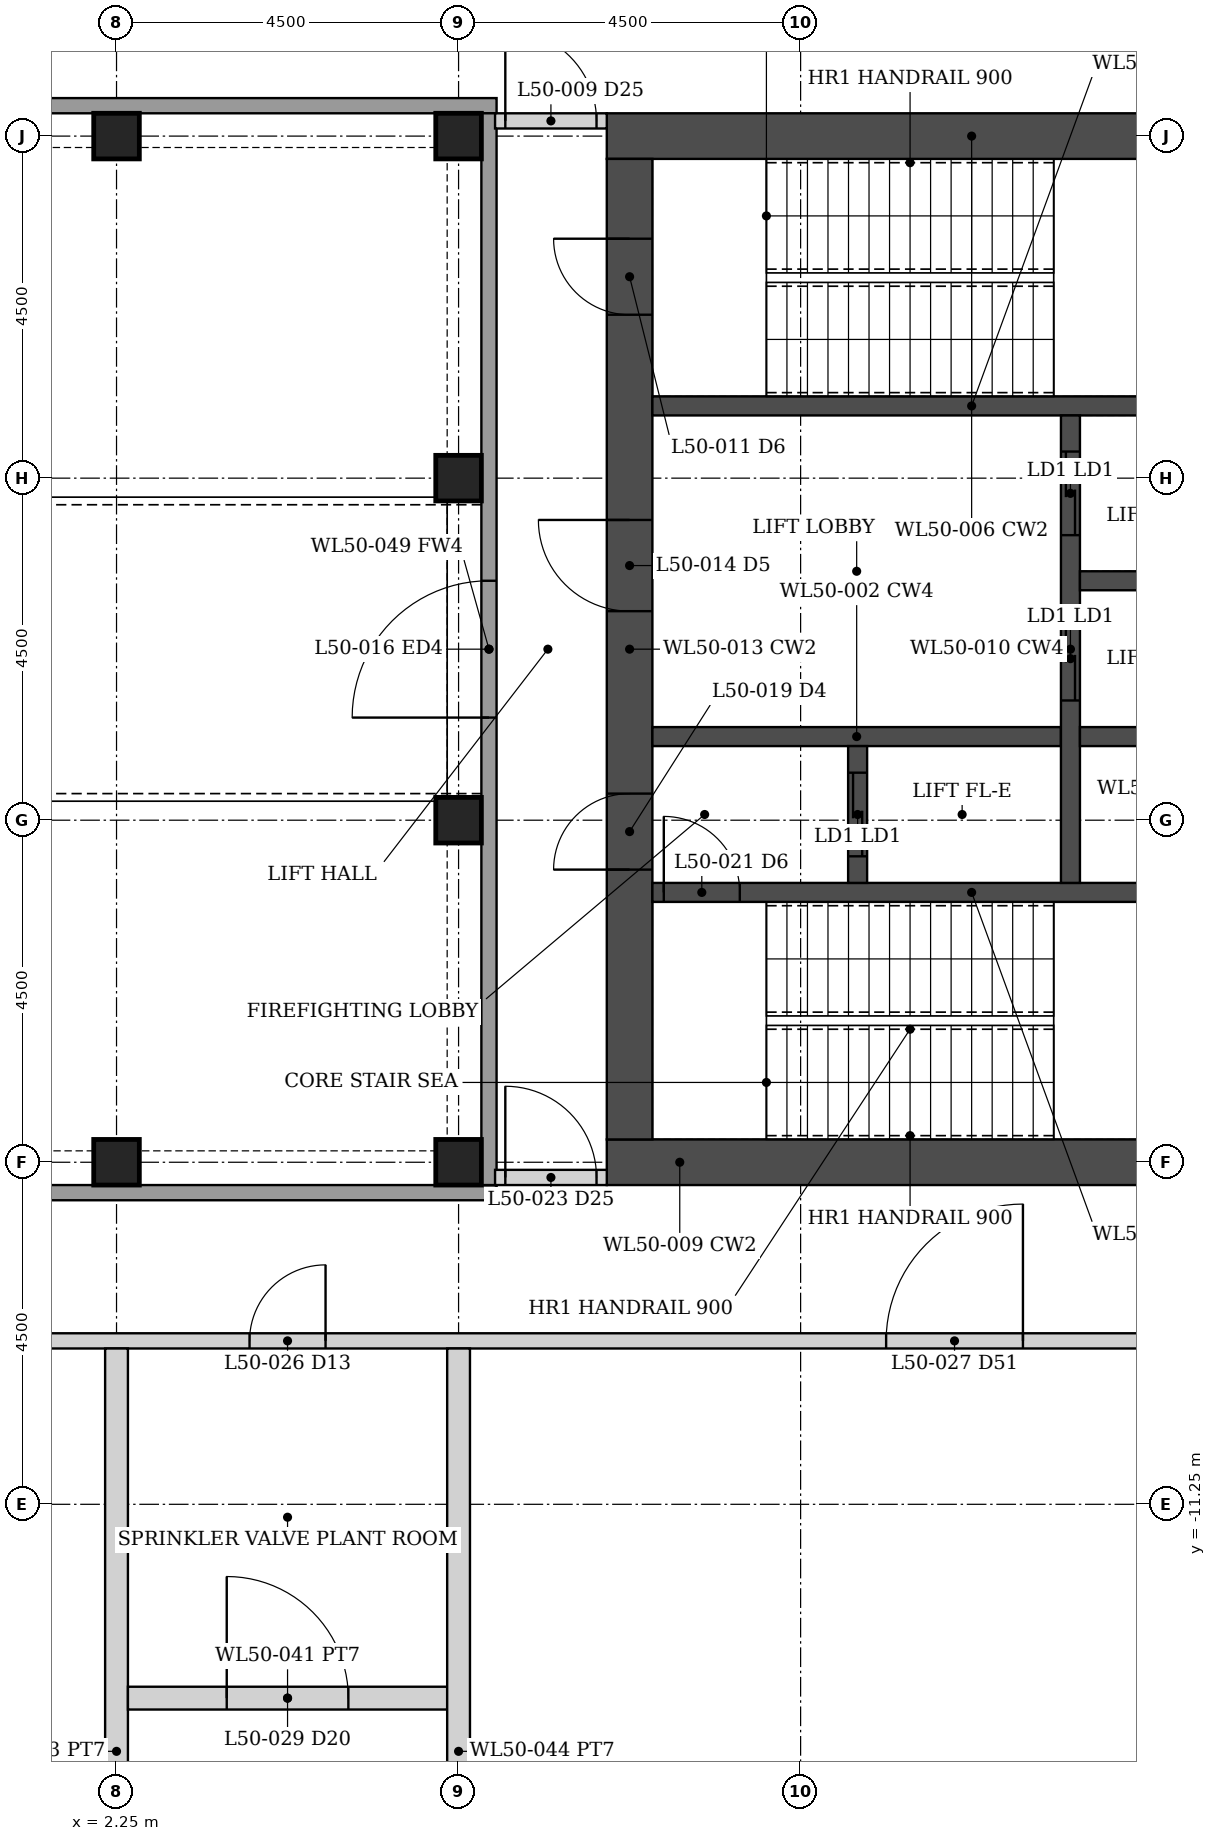
"""IFC4 building model, lengths in metres.
Left out: names, types, materials, properties, quantities, classifications, styles, units other than length and angle.
Written with IfcOpenShell. Run it as: python <this file> out.ifc"""

import sys

from ifc_helpers import new_model, si_unit, direction, frame, frame_2d, origin, origin_2d, place, context, subcontext, project, spatial, rectangle, hollow_rectangle, extrude, element, fill, save


model = new_model("IFC4")
c1 = context("Model", 3, precision=1e-05, world=origin(), true_north=direction((0.0, 1.0)))
c2 = subcontext(c1, "Body", "Model", "MODEL_VIEW")
j1 = project(units=[si_unit("LENGTHUNIT", "METRE"), si_unit("PLANEANGLEUNIT", "RADIAN")], contexts=[c1])
p1 = place(None, origin())
s1 = spatial("IfcSite", under=j1, at=p1, CompositionType="ELEMENT")
p2 = place(p1, origin())
s2 = spatial("IfcBuilding", under=s1, at=p2, CompositionType="ELEMENT")
p3 = place(p2, frame((0.0, 0.0, 190.4)))
s3 = spatial("IfcBuildingStorey", under=s2, at=p3, CompositionType="ELEMENT", Elevation=190.4)
for number, where, z_axis, x_axis in (
    (1, (2.25, -6.75, 0.0), (0.0, 0.0, 1.0), (1.0, 0.0, 0.0)),
    (2, (2.25, 6.75, 0.0), (0.0, 0.0, 1.0), (1.0, 0.0, 0.0)),
    (3, (6.75, -6.75, 0.0), (0.0, 0.0, 1.0), (1.0, 0.0, 0.0)),
    (4, (6.75, -2.25, 0.0), (0.0, 0.0, 1.0), (1.0, 0.0, 0.0)),
    (5, (6.75, 2.25, 0.0), (0.0, 0.0, 1.0), (1.0, 0.0, 0.0)),
    (6, (6.75, 6.75, 0.0), (0.0, 0.0, 1.0), (1.0, 0.0, 0.0)),
):
    element("IfcColumn", number, at=place(p3, frame(where, z_axis=z_axis, x_axis=x_axis)), inside=s3, PredefinedType="COLUMN", context=c2, shape_type="SweptSolid", body=[
        extrude(hollow_rectangle(XDim=0.6, YDim=0.6, WallThickness=0.03, at=origin_2d()), origin(), (0.0, 0.0, 1.0), 5.4),
    ])
for number, where, z_axis, x_axis in (
    (7, (8.7, -6.75, 0.0), (0.0, 0.0, 1.0), (1.0, 0.0, 0.0)),
    (8, (8.7, 6.75, 0.0), (0.0, 0.0, 1.0), (1.0, 0.0, 0.0)),
):
    element("IfcWall", number, at=place(p3, frame(where, z_axis=z_axis, x_axis=x_axis)), inside=s3, PredefinedType="SHEAR", context=c2, shape_type="SweptSolid", body=[
        extrude(rectangle(XDim=9.6, YDim=0.6, at=frame_2d((4.8, 0.0))), origin(), (0.0, 0.0, 1.0), 5.4),
    ])
p4 = place(p3, frame((9.0, -6.45, 0.0), z_axis=(0.0, 0.0, 1.0), x_axis=(0.0, 1.0, 0.0)))
e9 = element("IfcWall", 9, at=p4, inside=s3, PredefinedType="SHEAR", context=c2, shape_type="SweptSolid", body=[
    extrude(rectangle(XDim=12.9, YDim=0.6, at=frame_2d((6.45, 0.0))), origin(), (0.0, 0.0, 1.0), 5.4),
])
p5 = place(p4, frame((3.55, 0.0, 0.0)))
e10 = element("IfcOpeningElement", 10, at=p5, cuts=e9, PredefinedType="OPENING", context=c2, shape_type="SweptSolid", body=[
    extrude(rectangle(XDim=1.0, YDim=2.1, at=frame_2d((0.5, 1.05))), frame((0.0, 0.31, 0.0), z_axis=(0.0, -1.0, 0.0), x_axis=(1.0, 0.0, 0.0)), (0.0, 0.0, 1.0), 0.62),
])
p6 = place(p4, frame((6.95, 0.0, 0.0)))
e11 = element("IfcOpeningElement", 11, at=p6, cuts=e9, PredefinedType="OPENING", context=c2, shape_type="SweptSolid", body=[
    extrude(rectangle(XDim=1.2, YDim=2.1, at=frame_2d((0.6, 1.05))), frame((0.0, 0.31, 0.0), z_axis=(0.0, -1.0, 0.0), x_axis=(1.0, 0.0, 0.0)), (0.0, 0.0, 1.0), 0.62),
])
p7 = place(p4, frame((10.85, 0.0, 0.0)))
e12 = element("IfcOpeningElement", 12, at=p7, cuts=e9, PredefinedType="OPENING", context=c2, shape_type="SweptSolid", body=[
    extrude(rectangle(XDim=1.0, YDim=2.1, at=frame_2d((0.5, 1.05))), frame((0.0, 0.31, 0.0), z_axis=(0.0, -1.0, 0.0), x_axis=(1.0, 0.0, 0.0)), (0.0, 0.0, 1.0), 0.62),
])
p8 = place(p3, frame((9.3, -3.2, 0.0), z_axis=(0.0, 0.0, 1.0), x_axis=(1.0, 0.0, 0.0)))
e13 = element("IfcWall", 13, at=p8, inside=s3, PredefinedType="SHEAR", context=c2, shape_type="SweptSolid", body=[
    extrude(rectangle(XDim=8.4, YDim=0.25, at=frame_2d((4.2, 0.0))), origin(), (0.0, 0.0, 1.0), 5.4),
])
p9 = place(p8, frame((0.15, 0.0, 0.0)))
e14 = element("IfcOpeningElement", 14, at=p9, cuts=e13, PredefinedType="OPENING", context=c2, shape_type="SweptSolid", body=[
    extrude(rectangle(XDim=1.0, YDim=2.1, at=frame_2d((0.5, 1.05))), frame((0.0, 0.135, 0.0), z_axis=(0.0, -1.0, 0.0), x_axis=(1.0, 0.0, 0.0)), (0.0, 0.0, 1.0), 0.27),
])
p10 = place(p3, frame((9.3, 3.2, 0.0), z_axis=(0.0, 0.0, 1.0), x_axis=(1.0, 0.0, 0.0)))
e15 = element("IfcWall", 15, at=p10, inside=s3, PredefinedType="SHEAR", context=c2, shape_type="SweptSolid", body=[
    extrude(rectangle(XDim=8.4, YDim=0.25, at=frame_2d((4.2, 0.0))), origin(), (0.0, 0.0, 1.0), 5.4),
])
p11 = place(p3, frame((9.3, -1.15, 0.0), z_axis=(0.0, 0.0, 1.0), x_axis=(1.0, 0.0, 0.0)))
e16 = element("IfcWall", 16, at=p11, inside=s3, PredefinedType="SHEAR", context=c2, shape_type="SweptSolid", body=[
    extrude(rectangle(XDim=5.375, YDim=0.25, at=frame_2d((2.688, 0.0))), origin(), (0.0, 0.0, 1.0), 5.4),
])
p12 = place(p3, frame((12.0, -3.075, 0.0), z_axis=(0.0, 0.0, 1.0), x_axis=(0.0, 1.0, 0.0)))
e17 = element("IfcWall", 17, at=p12, inside=s3, PredefinedType="SHEAR", context=c2, shape_type="SweptSolid", body=[
    extrude(rectangle(XDim=1.8, YDim=0.25, at=frame_2d((0.9, 0.0))), origin(), (0.0, 0.0, 1.0), 5.4),
])
p13 = place(p12, frame((0.35, 0.0, 0.0)))
e18 = element("IfcOpeningElement", 18, at=p13, cuts=e17, PredefinedType="OPENING", context=c2, shape_type="SweptSolid", body=[
    extrude(rectangle(XDim=1.1, YDim=2.1, at=frame_2d((0.55, 1.05))), frame((0.0, 0.135, 0.0), z_axis=(0.0, -1.0, 0.0), x_axis=(1.0, 0.0, 0.0)), (0.0, 0.0, 1.0), 0.27),
])
p14 = place(p3, frame((14.8, -3.075, 0.0), z_axis=(0.0, 0.0, 1.0), x_axis=(0.0, 1.0, 0.0)))
e19 = element("IfcWall", 19, at=p14, inside=s3, PredefinedType="SHEAR", context=c2, shape_type="SweptSolid", body=[
    extrude(rectangle(XDim=6.15, YDim=0.25, at=frame_2d((3.075, 0.0))), origin(), (0.0, 0.0, 1.0), 5.4),
])
p15 = place(p14, frame((2.4, 0.0, 0.0)))
e20 = element("IfcOpeningElement", 20, at=p15, cuts=e19, PredefinedType="OPENING", context=c2, shape_type="SweptSolid", body=[
    extrude(rectangle(XDim=1.1, YDim=2.1, at=frame_2d((0.55, 1.05))), frame((0.0, 0.135, 0.0), z_axis=(0.0, -1.0, 0.0), x_axis=(1.0, 0.0, 0.0)), (0.0, 0.0, 1.0), 0.27),
])
p16 = place(p14, frame((4.575, 0.0, 0.0)))
e21 = element("IfcOpeningElement", 21, at=p16, cuts=e19, PredefinedType="OPENING", context=c2, shape_type="SweptSolid", body=[
    extrude(rectangle(XDim=1.1, YDim=2.1, at=frame_2d((0.55, 1.05))), frame((0.0, 0.135, 0.0), z_axis=(0.0, -1.0, 0.0), x_axis=(1.0, 0.0, 0.0)), (0.0, 0.0, 1.0), 0.27),
])
for number, where, z_axis, x_axis in (
    (22, (14.925, -1.15, 0.0), (0.0, 0.0, 1.0), (1.0, 0.0, 0.0)),
    (23, (14.925, 0.9, 0.0), (0.0, 0.0, 1.0), (1.0, 0.0, 0.0)),
):
    element("IfcWall", number, at=place(p3, frame(where, z_axis=z_axis, x_axis=x_axis)), inside=s3, PredefinedType="SHEAR", context=c2, shape_type="SweptSolid", body=[
        extrude(rectangle(XDim=2.775, YDim=0.25, at=frame_2d((1.387, 0.0))), origin(), (0.0, 0.0, 1.0), 5.4),
    ])
p17 = place(p3, frame((11.105, -19.9, 0.0), z_axis=(0.0, 0.0, 1.0), x_axis=(0.707106781187, 0.707106781187, 0.0)))
e24 = element("IfcWall", 24, at=p17, inside=s3, PredefinedType="SOLIDWALL", context=c2, shape_type="SweptSolid", body=[
    extrude(rectangle(XDim=12.438, YDim=0.2, at=frame_2d((6.219, 0.0))), origin(), (0.0, 0.0, 1.0), 4.299),
])
for number, where, z_axis, x_axis in (
    (25, (-7.25, 7.15, 0.0), (0.0, 0.0, 1.0), (1.0, 0.0, 0.0)),
    (26, (-7.25, -7.15, 0.0), (0.0, 0.0, 1.0), (1.0, 0.0, 0.0)),
):
    element("IfcWall", number, at=place(p3, frame(where, z_axis=z_axis, x_axis=x_axis)), inside=s3, PredefinedType="SOLIDWALL", context=c2, shape_type="SweptSolid", body=[
        extrude(rectangle(XDim=14.5, YDim=0.2, at=frame_2d((7.25, 0.0))), origin(), (0.0, 0.0, 1.0), 4.229),
    ])
p18 = place(p3, frame((7.15, -7.05, 0.0), z_axis=(0.0, 0.0, 1.0), x_axis=(0.0, 1.0, 0.0)))
e27 = element("IfcWall", 27, at=p18, inside=s3, PredefinedType="SOLIDWALL", context=c2, shape_type="SweptSolid", body=[
    extrude(rectangle(XDim=14.1, YDim=0.2, at=frame_2d((7.05, 0.0))), origin(), (0.0, 0.0, 1.0), 4.229),
])
p19 = place(p18, frame((6.15, 0.0, 0.0)))
e28 = element("IfcOpeningElement", 28, at=p19, cuts=e27, PredefinedType="OPENING", context=c2, shape_type="SweptSolid", body=[
    extrude(rectangle(XDim=1.8, YDim=2.2, at=frame_2d((0.9, 1.1))), frame((0.0, 0.11, 0.0), z_axis=(0.0, -1.0, 0.0), x_axis=(1.0, 0.0, 0.0)), (0.0, 0.0, 1.0), 0.22),
])
p20 = place(p3, frame((7.23, 6.95, 0.0), z_axis=(0.0, 0.0, 1.0), x_axis=(1.0, 0.0, 0.0)))
e29 = element("IfcWall", 29, at=p20, inside=s3, PredefinedType="PARTITIONING", context=c2, shape_type="SweptSolid", body=[
    extrude(rectangle(XDim=1.47, YDim=0.2, at=frame_2d((0.735, 0.0))), origin(), (0.0, 0.0, 1.0), 4.229),
])
p21 = place(p20, frame((0.135, 0.0, 0.0)))
e30 = element("IfcOpeningElement", 30, at=p21, cuts=e29, PredefinedType="OPENING", context=c2, shape_type="SweptSolid", body=[
    extrude(rectangle(XDim=1.2, YDim=2.1, at=frame_2d((0.6, 1.05))), frame((0.0, 0.11, 0.0), z_axis=(0.0, -1.0, 0.0), x_axis=(1.0, 0.0, 0.0)), (0.0, 0.0, 1.0), 0.22),
])
p22 = place(p3, frame((7.23, -6.95, 0.0), z_axis=(0.0, 0.0, 1.0), x_axis=(1.0, 0.0, 0.0)))
e31 = element("IfcWall", 31, at=p22, inside=s3, PredefinedType="PARTITIONING", context=c2, shape_type="SweptSolid", body=[
    extrude(rectangle(XDim=1.47, YDim=0.2, at=frame_2d((0.735, 0.0))), origin(), (0.0, 0.0, 1.0), 4.229),
])
p23 = place(p22, frame((0.135, 0.0, 0.0)))
e32 = element("IfcOpeningElement", 32, at=p23, cuts=e31, PredefinedType="OPENING", context=c2, shape_type="SweptSolid", body=[
    extrude(rectangle(XDim=1.2, YDim=2.1, at=frame_2d((0.6, 1.05))), frame((0.0, 0.11, 0.0), z_axis=(0.0, -1.0, 0.0), x_axis=(1.0, 0.0, 0.0)), (0.0, 0.0, 1.0), 0.22),
])
p24 = place(p3, frame((-19.8, -9.1, 0.0), z_axis=(0.0, 0.0, 1.0), x_axis=(1.0, 0.0, 0.0)))
e33 = element("IfcWall", 33, at=p24, inside=s3, PredefinedType="PARTITIONING", context=c2, shape_type="SweptSolid", body=[
    extrude(rectangle(XDim=39.6, YDim=0.2, at=frame_2d((19.8, 0.0))), origin(), (0.0, 0.0, 1.0), 4.229),
])
p25 = place(p24, frame((6.025, 0.0, 0.0)))
e34 = element("IfcOpeningElement", 34, at=p25, cuts=e33, PredefinedType="OPENING", context=c2, shape_type="SweptSolid", body=[
    extrude(rectangle(XDim=1.0, YDim=2.1, at=frame_2d((0.5, 1.05))), frame((0.0, 0.11, 0.0), z_axis=(0.0, -1.0, 0.0), x_axis=(1.0, 0.0, 0.0)), (0.0, 0.0, 1.0), 0.22),
])
p26 = place(p24, frame((16.75, 0.0, 0.0)))
e35 = element("IfcOpeningElement", 35, at=p26, cuts=e33, PredefinedType="OPENING", context=c2, shape_type="SweptSolid", body=[
    extrude(rectangle(XDim=1.6, YDim=2.4, at=frame_2d((0.8, 1.2))), frame((0.0, 0.11, 0.0), z_axis=(0.0, -1.0, 0.0), x_axis=(1.0, 0.0, 0.0)), (0.0, 0.0, 1.0), 0.22),
])
p27 = place(p24, frame((23.8, 0.0, 0.0)))
e36 = element("IfcOpeningElement", 36, at=p27, cuts=e33, PredefinedType="OPENING", context=c2, shape_type="SweptSolid", body=[
    extrude(rectangle(XDim=1.0, YDim=2.1, at=frame_2d((0.5, 1.05))), frame((0.0, 0.11, 0.0), z_axis=(0.0, -1.0, 0.0), x_axis=(1.0, 0.0, 0.0)), (0.0, 0.0, 1.0), 0.22),
])
p28 = place(p24, frame((32.175, 0.0, 0.0)))
e37 = element("IfcOpeningElement", 37, at=p28, cuts=e33, PredefinedType="OPENING", context=c2, shape_type="SweptSolid", body=[
    extrude(rectangle(XDim=1.8, YDim=2.1, at=frame_2d((0.9, 1.05))), frame((0.0, 0.11, 0.0), z_axis=(0.0, -1.0, 0.0), x_axis=(1.0, 0.0, 0.0)), (0.0, 0.0, 1.0), 0.22),
])
p29 = place(p3, frame((2.25, -19.8, 0.0), z_axis=(0.0, 0.0, 1.0), x_axis=(0.0, 1.0, 0.0)))
e38 = element("IfcWall", 38, at=p29, inside=s3, PredefinedType="PARTITIONING", context=c2, shape_type="SweptSolid", body=[
    extrude(rectangle(XDim=10.6, YDim=0.3, at=frame_2d((5.3, 0.0))), origin(), (0.0, 0.0, 1.0), 4.229),
])
p30 = place(p3, frame((2.4, -13.8, 0.0), z_axis=(0.0, 0.0, 1.0), x_axis=(1.0, 0.0, 0.0)))
e39 = element("IfcWall", 39, at=p30, inside=s3, PredefinedType="PARTITIONING", context=c2, shape_type="SweptSolid", body=[
    extrude(rectangle(XDim=4.2, YDim=0.3, at=frame_2d((2.1, 0.0))), origin(), (0.0, 0.0, 1.0), 4.229),
])
p31 = place(p30, frame((1.3, 0.0, 0.0)))
e40 = element("IfcOpeningElement", 40, at=p31, cuts=e39, PredefinedType="OPENING", context=c2, shape_type="SweptSolid", body=[
    extrude(rectangle(XDim=1.6, YDim=2.4, at=frame_2d((0.8, 1.2))), frame((0.0, 0.16, 0.0), z_axis=(0.0, -1.0, 0.0), x_axis=(1.0, 0.0, 0.0)), (0.0, 0.0, 1.0), 0.32),
])
p32 = place(p3, frame((6.75, -19.8, 0.0), z_axis=(0.0, 0.0, 1.0), x_axis=(0.0, 1.0, 0.0)))
e41 = element("IfcWall", 41, at=p32, inside=s3, PredefinedType="PARTITIONING", context=c2, shape_type="SweptSolid", body=[
    extrude(rectangle(XDim=10.6, YDim=0.3, at=frame_2d((5.3, 0.0))), origin(), (0.0, 0.0, 1.0), 4.229),
])
p33 = place(p19, origin())
e42 = element("IfcDoor", 42, at=p33, inside=s3, OperationType="DOUBLE_DOOR_SINGLE_SWING", PredefinedType="DOOR", context=c2, shape_type="SweptSolid", body=[
    extrude(rectangle(XDim=1.8, YDim=2.2, at=frame_2d((0.9, 1.1))), frame((0.0, 0.025, 0.0), z_axis=(0.0, -1.0, 0.0), x_axis=(1.0, 0.0, 0.0)), (0.0, 0.0, 1.0), 0.05),
])
fill(e28, e42)
p34 = place(p21, origin())
e43 = element("IfcDoor", 43, at=p34, inside=s3, OperationType="DOUBLE_DOOR_DOUBLE_SWING", PredefinedType="DOOR", context=c2, shape_type="SweptSolid", body=[
    extrude(rectangle(XDim=1.2, YDim=2.1, at=frame_2d((0.6, 1.05))), frame((0.0, 0.025, 0.0), z_axis=(0.0, -1.0, 0.0), x_axis=(1.0, 0.0, 0.0)), (0.0, 0.0, 1.0), 0.05),
])
fill(e30, e43)
p35 = place(p23, origin())
e44 = element("IfcDoor", 44, at=p35, inside=s3, OperationType="DOUBLE_DOOR_DOUBLE_SWING", PredefinedType="DOOR", context=c2, shape_type="SweptSolid", body=[
    extrude(rectangle(XDim=1.2, YDim=2.1, at=frame_2d((0.6, 1.05))), frame((0.0, 0.025, 0.0), z_axis=(0.0, -1.0, 0.0), x_axis=(1.0, 0.0, 0.0)), (0.0, 0.0, 1.0), 0.05),
])
fill(e32, e44)
p36 = place(p27, origin())
e45 = element("IfcDoor", 45, at=p36, inside=s3, OperationType="SINGLE_SWING_RIGHT", PredefinedType="DOOR", context=c2, shape_type="SweptSolid", body=[
    extrude(rectangle(XDim=1.0, YDim=2.1, at=frame_2d((0.5, 1.05))), frame((0.0, 0.025, 0.0), z_axis=(0.0, -1.0, 0.0), x_axis=(1.0, 0.0, 0.0)), (0.0, 0.0, 1.0), 0.05),
])
fill(e36, e45)
p37 = place(p31, origin())
e46 = element("IfcDoor", 46, at=p37, inside=s3, OperationType="SINGLE_SWING_LEFT", PredefinedType="DOOR", context=c2, shape_type="SweptSolid", body=[
    extrude(rectangle(XDim=1.6, YDim=2.4, at=frame_2d((0.8, 1.2))), frame((0.0, 0.025, 0.0), z_axis=(0.0, -1.0, 0.0), x_axis=(1.0, 0.0, 0.0)), (0.0, 0.0, 1.0), 0.05),
])
fill(e40, e46)
p38 = place(p28, origin())
e47 = element("IfcDoor", 47, at=p38, inside=s3, OperationType="SINGLE_SWING_RIGHT", PredefinedType="DOOR", context=c2, shape_type="SweptSolid", body=[
    extrude(rectangle(XDim=1.8, YDim=2.1, at=frame_2d((0.9, 1.05))), frame((0.0, 0.025, 0.0), z_axis=(0.0, -1.0, 0.0), x_axis=(1.0, 0.0, 0.0)), (0.0, 0.0, 1.0), 0.05),
])
fill(e37, e47)
p39 = place(p5, origin())
e48 = element("IfcDoor", 48, at=p39, inside=s3, OperationType="SINGLE_SWING_LEFT", PredefinedType="DOOR", context=c2, shape_type="SweptSolid", body=[
    extrude(rectangle(XDim=1.0, YDim=2.1, at=frame_2d((0.5, 1.05))), frame((0.0, 0.025, 0.0), z_axis=(0.0, -1.0, 0.0), x_axis=(1.0, 0.0, 0.0)), (0.0, 0.0, 1.0), 0.05),
])
fill(e10, e48)
p40 = place(p9, origin())
e49 = element("IfcDoor", 49, at=p40, inside=s3, OperationType="SINGLE_SWING_LEFT", PredefinedType="DOOR", context=c2, shape_type="SweptSolid", body=[
    extrude(rectangle(XDim=1.0, YDim=2.1, at=frame_2d((0.5, 1.05))), frame((0.0, 0.025, 0.0), z_axis=(0.0, -1.0, 0.0), x_axis=(1.0, 0.0, 0.0)), (0.0, 0.0, 1.0), 0.05),
])
fill(e14, e49)
p41 = place(p6, origin())
e50 = element("IfcDoor", 50, at=p41, inside=s3, OperationType="SINGLE_SWING_RIGHT", PredefinedType="DOOR", context=c2, shape_type="SweptSolid", body=[
    extrude(rectangle(XDim=1.2, YDim=2.1, at=frame_2d((0.6, 1.05))), frame((0.0, 0.025, 0.0), z_axis=(0.0, -1.0, 0.0), x_axis=(1.0, 0.0, 0.0)), (0.0, 0.0, 1.0), 0.05),
])
fill(e11, e50)
p42 = place(p7, origin())
e51 = element("IfcDoor", 51, at=p42, inside=s3, OperationType="SINGLE_SWING_RIGHT", PredefinedType="DOOR", context=c2, shape_type="SweptSolid", body=[
    extrude(rectangle(XDim=1.0, YDim=2.1, at=frame_2d((0.5, 1.05))), frame((0.0, 0.025, 0.0), z_axis=(0.0, -1.0, 0.0), x_axis=(1.0, 0.0, 0.0)), (0.0, 0.0, 1.0), 0.05),
])
fill(e12, e51)
p43 = place(p13, origin())
e52 = element("IfcDoor", 52, at=p43, inside=s3, OperationType="DOUBLE_DOOR_SLIDING", PredefinedType="DOOR", context=c2, shape_type="SweptSolid", body=[
    extrude(rectangle(XDim=1.1, YDim=2.1, at=frame_2d((0.55, 1.05))), frame((0.0, 0.025, 0.0), z_axis=(0.0, -1.0, 0.0), x_axis=(1.0, 0.0, 0.0)), (0.0, 0.0, 1.0), 0.05),
])
fill(e18, e52)
p44 = place(p15, origin())
e53 = element("IfcDoor", 53, at=p44, inside=s3, OperationType="DOUBLE_DOOR_SLIDING", PredefinedType="DOOR", context=c2, shape_type="SweptSolid", body=[
    extrude(rectangle(XDim=1.1, YDim=2.1, at=frame_2d((0.55, 1.05))), frame((0.0, 0.025, 0.0), z_axis=(0.0, -1.0, 0.0), x_axis=(1.0, 0.0, 0.0)), (0.0, 0.0, 1.0), 0.05),
])
fill(e20, e53)
p45 = place(p16, origin())
e54 = element("IfcDoor", 54, at=p45, inside=s3, OperationType="DOUBLE_DOOR_SLIDING", PredefinedType="DOOR", context=c2, shape_type="SweptSolid", body=[
    extrude(rectangle(XDim=1.1, YDim=2.1, at=frame_2d((0.55, 1.05))), frame((0.0, 0.025, 0.0), z_axis=(0.0, -1.0, 0.0), x_axis=(1.0, 0.0, 0.0)), (0.0, 0.0, 1.0), 0.05),
])
fill(e21, e54)
save(model, sys.argv[1])
